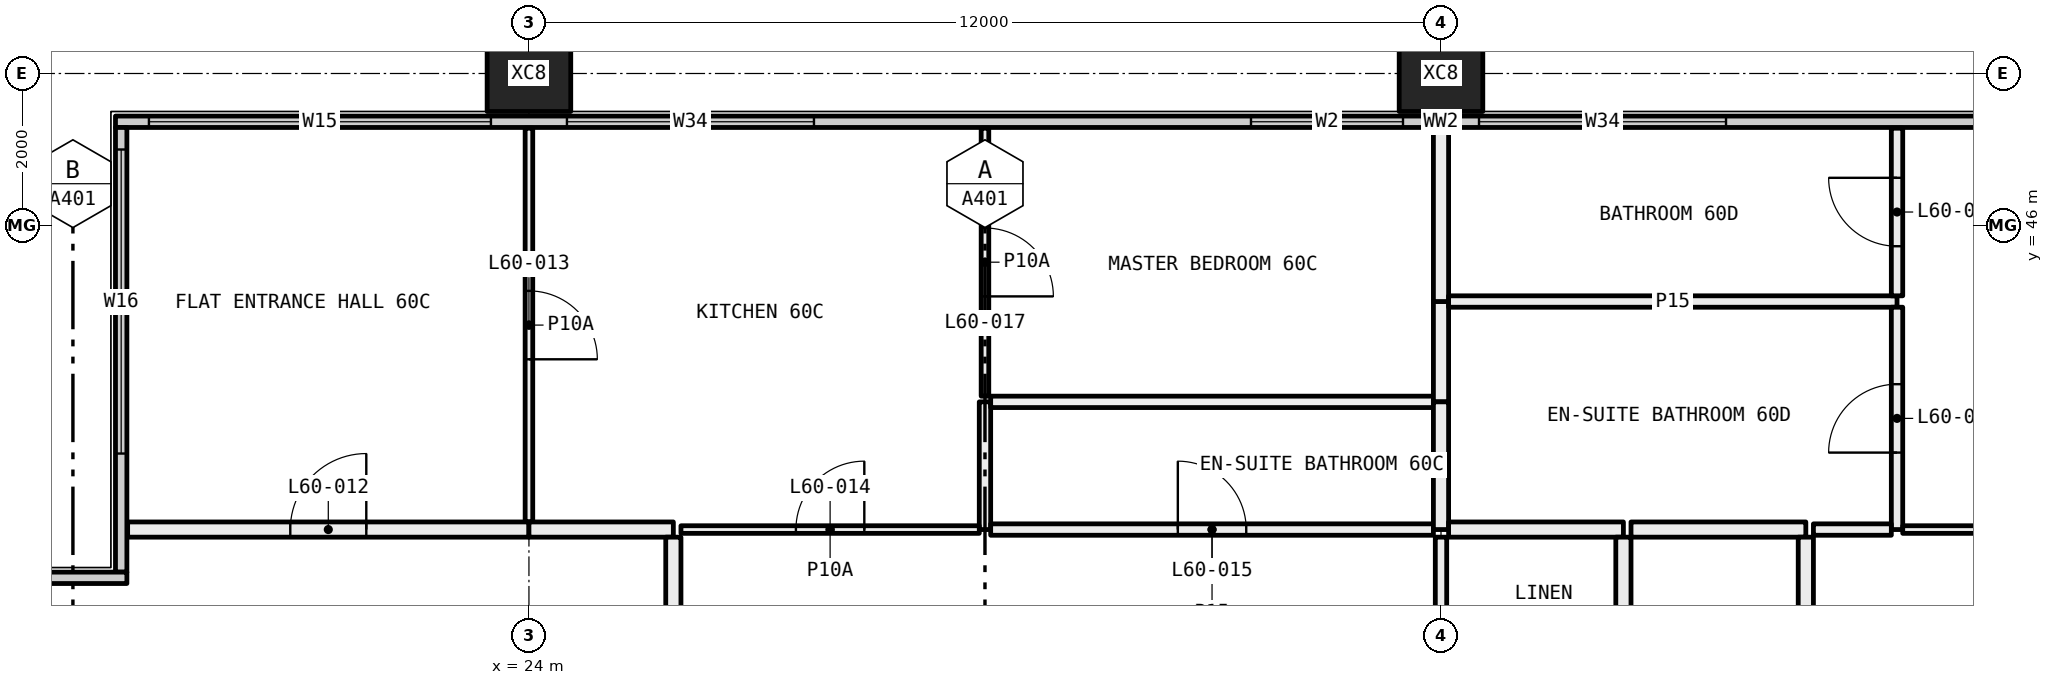
"""IFC4 building model, lengths in metres.
Left out: names, types, materials, properties, quantities, classifications, styles, units other than length and angle.
Written with IfcOpenShell. Run it as: python <this file> out.ifc"""

import sys

from ifc_helpers import new_model, si_unit, direction, frame, frame_2d, origin, origin_2d, place, context, subcontext, project, spatial, rectangle, hollow_rectangle, extrude, element, fill, save


model = new_model("IFC4")
c1 = context("Model", 3, precision=1e-05, world=origin(), true_north=direction((0.0, 1.0)))
c2 = subcontext(c1, "Body", "Model", "MODEL_VIEW")
j1 = project(units=[si_unit("LENGTHUNIT", "METRE"), si_unit("PLANEANGLEUNIT", "RADIAN")], contexts=[c1])
p1 = place(None, origin())
s1 = spatial("IfcSite", under=j1, at=p1, CompositionType="ELEMENT")
p2 = place(p1, origin())
s2 = spatial("IfcBuilding", under=s1, at=p2, CompositionType="ELEMENT")
p3 = place(p2, frame((0.0, 0.0, 224.85)))
s3 = spatial("IfcBuildingStorey", under=s2, at=p3, CompositionType="ELEMENT", Elevation=224.85)
for number, where, z_axis, x_axis in (
    (1, (24.0, 48.0, -0.4), (0.0, 0.0, 1.0), (1.0, 0.0, 0.0)),
    (2, (36.0, 48.0, -0.4), (0.0, 0.0, 1.0), (1.0, 0.0, 0.0)),
):
    element("IfcColumn", number, at=place(p3, frame(where, z_axis=z_axis, x_axis=x_axis)), inside=s3, PredefinedType="COLUMN", context=c2, shape_type="SweptSolid", body=[
        extrude(hollow_rectangle(XDim=1.1, YDim=1.0, WallThickness=0.04, at=origin_2d()), origin(), (0.0, 0.0, 1.0), 3.45),
    ])
p4 = place(p3, frame((18.56, 47.365, 0.0), z_axis=(0.0, 0.0, 1.0), x_axis=(1.0, 0.0, 0.0)))
e3 = element("IfcWall", 3, at=p4, inside=s3, PredefinedType="ELEMENTEDWALL", context=c2, shape_type="SweptSolid", body=[
    extrude(rectangle(XDim=34.88, YDim=0.15, at=frame_2d((17.44, 0.0))), origin(), (0.0, 0.0, 1.0), 3.05),
])
p5 = place(p4, frame((0.44, 0.0, 0.45)))
e4 = element("IfcOpeningElement", 4, at=p5, cuts=e3, PredefinedType="OPENING", context=c2, shape_type="SweptSolid", body=[
    extrude(rectangle(XDim=4.5, YDim=2.55, at=frame_2d((2.25, 1.275))), frame((0.0, 0.085, 0.0), z_axis=(0.0, -1.0, 0.0), x_axis=(1.0, 0.0, 0.0)), (0.0, 0.0, 1.0), 0.17),
])
p6 = place(p4, frame((5.94, 0.0, 0.45)))
e5 = element("IfcOpeningElement", 5, at=p6, cuts=e3, PredefinedType="OPENING", context=c2, shape_type="SweptSolid", body=[
    extrude(rectangle(XDim=3.25, YDim=2.55, at=frame_2d((1.625, 1.275))), frame((0.0, 0.085, 0.0), z_axis=(0.0, -1.0, 0.0), x_axis=(1.0, 0.0, 0.0)), (0.0, 0.0, 1.0), 0.17),
])
p7 = place(p4, frame((14.94, 0.0, 0.45)))
e6 = element("IfcOpeningElement", 6, at=p7, cuts=e3, PredefinedType="OPENING", context=c2, shape_type="SweptSolid", body=[
    extrude(rectangle(XDim=2.0, YDim=2.55, at=frame_2d((1.0, 1.275))), frame((0.0, 0.085, 0.0), z_axis=(0.0, -1.0, 0.0), x_axis=(1.0, 0.0, 0.0)), (0.0, 0.0, 1.0), 0.17),
])
p8 = place(p4, frame((17.94, 0.0, 0.45)))
e7 = element("IfcOpeningElement", 7, at=p8, cuts=e3, PredefinedType="OPENING", context=c2, shape_type="SweptSolid", body=[
    extrude(rectangle(XDim=3.25, YDim=2.55, at=frame_2d((1.625, 1.275))), frame((0.0, 0.085, 0.0), z_axis=(0.0, -1.0, 0.0), x_axis=(1.0, 0.0, 0.0)), (0.0, 0.0, 1.0), 0.17),
])
p9 = place(p4, frame((25.69, 0.0, 0.45)))
e8 = element("IfcOpeningElement", 8, at=p9, cuts=e3, PredefinedType="OPENING", context=c2, shape_type="SweptSolid", body=[
    extrude(rectangle(XDim=3.25, YDim=2.55, at=frame_2d((1.625, 1.275))), frame((0.0, 0.085, 0.0), z_axis=(0.0, -1.0, 0.0), x_axis=(1.0, 0.0, 0.0)), (0.0, 0.0, 1.0), 0.17),
])
p10 = place(p4, frame((29.94, 0.0, 0.45)))
e9 = element("IfcOpeningElement", 9, at=p10, cuts=e3, PredefinedType="OPENING", context=c2, shape_type="SweptSolid", body=[
    extrude(rectangle(XDim=4.5, YDim=2.55, at=frame_2d((2.25, 1.275))), frame((0.0, 0.085, 0.0), z_axis=(0.0, -1.0, 0.0), x_axis=(1.0, 0.0, 0.0)), (0.0, 0.0, 1.0), 0.17),
])
p11 = place(p3, frame((18.635, 41.44, 0.0), z_axis=(0.0, 0.0, 1.0), x_axis=(0.0, 1.0, 0.0)))
e10 = element("IfcWall", 10, at=p11, inside=s3, PredefinedType="ELEMENTEDWALL", context=c2, shape_type="SweptSolid", body=[
    extrude(rectangle(XDim=5.85, YDim=0.15, at=frame_2d((2.925, 0.0))), origin(), (0.0, 0.0, 1.0), 3.05),
])
p12 = place(p11, frame((1.56, 0.0, 0.45)))
e11 = element("IfcOpeningElement", 11, at=p12, cuts=e10, PredefinedType="OPENING", context=c2, shape_type="SweptSolid", body=[
    extrude(rectangle(XDim=4.0, YDim=2.55, at=frame_2d((2.0, 1.275))), frame((0.0, 0.085, 0.0), z_axis=(0.0, -1.0, 0.0), x_axis=(1.0, 0.0, 0.0)), (0.0, 0.0, 1.0), 0.17),
])
p13 = place(p3, frame((12.56, 41.365, 0.0), z_axis=(0.0, 0.0, 1.0), x_axis=(1.0, 0.0, 0.0)))
e12 = element("IfcWall", 12, at=p13, inside=s3, PredefinedType="ELEMENTEDWALL", context=c2, shape_type="SweptSolid", body=[
    extrude(rectangle(XDim=6.15, YDim=0.15, at=frame_2d((3.075, 0.0))), origin(), (0.0, 0.0, 1.0), 3.05),
])
p14 = place(p13, frame((0.44, 0.0, 0.45)))
e13 = element("IfcOpeningElement", 13, at=p14, cuts=e12, PredefinedType="OPENING", context=c2, shape_type="SweptSolid", body=[
    extrude(rectangle(XDim=4.0, YDim=2.55, at=frame_2d((2.0, 1.275))), frame((0.0, 0.085, 0.0), z_axis=(0.0, -1.0, 0.0), x_axis=(1.0, 0.0, 0.0)), (0.0, 0.0, 1.0), 0.17),
])
p15 = place(p3, frame((24.0, 42.1, 0.0), z_axis=(0.0, 0.0, 1.0), x_axis=(0.0, 1.0, 0.0)))
e14 = element("IfcWall", 14, at=p15, inside=s3, PredefinedType="PARTITIONING", context=c2, shape_type="SweptSolid", body=[
    extrude(rectangle(XDim=5.18, YDim=0.1, at=frame_2d((2.59, 0.0))), origin(), (0.0, 0.0, 1.0), 3.05),
])
p16 = place(p15, frame((2.14, 0.0, 0.0)))
e15 = element("IfcOpeningElement", 15, at=p16, cuts=e14, PredefinedType="OPENING", context=c2, shape_type="SweptSolid", body=[
    extrude(rectangle(XDim=0.9, YDim=2.1, at=frame_2d((0.45, 1.05))), frame((0.0, 0.06, 0.0), z_axis=(0.0, -1.0, 0.0), x_axis=(1.0, 0.0, 0.0)), (0.0, 0.0, 1.0), 0.12),
])
p17 = place(p3, frame((18.72, 42.0, 0.0), z_axis=(0.0, 0.0, 1.0), x_axis=(1.0, 0.0, 0.0)))
e16 = element("IfcWall", 16, at=p17, inside=s3, PredefinedType="PARTITIONING", context=c2, shape_type="SweptSolid", body=[
    extrude(rectangle(XDim=5.28, YDim=0.2, at=frame_2d((2.64, 0.0))), origin(), (0.0, 0.0, 1.0), 3.05),
])
p18 = place(p17, frame((2.14, 0.0, 0.0)))
e17 = element("IfcOpeningElement", 17, at=p18, cuts=e16, PredefinedType="OPENING", context=c2, shape_type="SweptSolid", body=[
    extrude(rectangle(XDim=1.0, YDim=2.1, at=frame_2d((0.5, 1.05))), frame((0.0, 0.11, 0.0), z_axis=(0.0, -1.0, 0.0), x_axis=(1.0, 0.0, 0.0)), (0.0, 0.0, 1.0), 0.22),
])
p19 = place(p3, frame((30.0, 43.755, 0.0), z_axis=(0.0, 0.0, 1.0), x_axis=(0.0, 1.0, 0.0)))
e18 = element("IfcWall", 18, at=p19, inside=s3, PredefinedType="PARTITIONING", context=c2, shape_type="SweptSolid", body=[
    extrude(rectangle(XDim=3.525, YDim=0.1, at=frame_2d((1.763, 0.0))), origin(), (0.0, 0.0, 1.0), 3.05),
])
p20 = place(p19, frame((1.312, 0.0, 0.0)))
e19 = element("IfcOpeningElement", 19, at=p20, cuts=e18, PredefinedType="OPENING", context=c2, shape_type="SweptSolid", body=[
    extrude(rectangle(XDim=0.9, YDim=2.1, at=frame_2d((0.45, 1.05))), frame((0.0, 0.06, 0.0), z_axis=(0.0, -1.0, 0.0), x_axis=(1.0, 0.0, 0.0)), (0.0, 0.0, 1.0), 0.12),
])
p21 = place(p3, frame((30.0, 42.0, 0.0), z_axis=(0.0, 0.0, 1.0), x_axis=(0.0, 1.0, 0.0)))
e20 = element("IfcWall", 20, at=p21, inside=s3, PredefinedType="PARTITIONING", context=c2, shape_type="SweptSolid", body=[
    extrude(rectangle(XDim=1.68, YDim=0.15, at=frame_2d((0.84, 0.0))), origin(), (0.0, 0.0, 1.0), 3.05),
])
p22 = place(p3, frame((26.0, 42.0, 0.0), z_axis=(0.0, 0.0, 1.0), x_axis=(1.0, 0.0, 0.0)))
e21 = element("IfcWall", 21, at=p22, inside=s3, PredefinedType="PARTITIONING", context=c2, shape_type="SweptSolid", body=[
    extrude(rectangle(XDim=3.925, YDim=0.1, at=frame_2d((1.962, 0.0))), origin(), (0.0, 0.0, 1.0), 3.05),
])
p23 = place(p22, frame((1.512, 0.0, 0.0)))
e22 = element("IfcOpeningElement", 22, at=p23, cuts=e21, PredefinedType="OPENING", context=c2, shape_type="SweptSolid", body=[
    extrude(rectangle(XDim=0.9, YDim=2.1, at=frame_2d((0.45, 1.05))), frame((0.0, 0.06, 0.0), z_axis=(0.0, -1.0, 0.0), x_axis=(1.0, 0.0, 0.0)), (0.0, 0.0, 1.0), 0.12),
])
p24 = place(p3, frame((24.0, 42.0, 0.0), z_axis=(0.0, 0.0, 1.0), x_axis=(1.0, 0.0, 0.0)))
e23 = element("IfcWall", 23, at=p24, inside=s3, PredefinedType="PARTITIONING", context=c2, shape_type="SweptSolid", body=[
    extrude(rectangle(XDim=1.9, YDim=0.2, at=frame_2d((0.95, 0.0))), origin(), (0.0, 0.0, 1.0), 3.05),
])
p25 = place(p3, frame((30.075, 43.68, 0.0), z_axis=(0.0, 0.0, 1.0), x_axis=(1.0, 0.0, 0.0)))
e24 = element("IfcWall", 24, at=p25, inside=s3, PredefinedType="PARTITIONING", context=c2, shape_type="SweptSolid", body=[
    extrude(rectangle(XDim=5.825, YDim=0.15, at=frame_2d((2.913, 0.0))), origin(), (0.0, 0.0, 1.0), 3.05),
])
p26 = place(p3, frame((36.0, 43.68, 0.0), z_axis=(0.0, 0.0, 1.0), x_axis=(0.0, 1.0, 0.0)))
e25 = element("IfcWall", 25, at=p26, inside=s3, PredefinedType="PARTITIONING", context=c2, shape_type="SweptSolid", body=[
    extrude(rectangle(XDim=1.32, YDim=0.2, at=frame_2d((0.66, 0.0))), origin(), (0.0, 0.0, 1.0), 2.45),
])
p27 = place(p3, frame((36.0, 45.0, 0.0), z_axis=(0.0, 0.0, 1.0), x_axis=(0.0, 1.0, 0.0)))
e26 = element("IfcWall", 26, at=p27, inside=s3, PredefinedType="PARTITIONING", context=c2, shape_type="SweptSolid", body=[
    extrude(rectangle(XDim=2.28, YDim=0.2, at=frame_2d((1.14, 0.0))), origin(), (0.0, 0.0, 1.0), 2.45),
])
p28 = place(p3, frame((30.075, 42.0, 0.0), z_axis=(0.0, 0.0, 1.0), x_axis=(1.0, 0.0, 0.0)))
e27 = element("IfcWall", 27, at=p28, inside=s3, PredefinedType="PARTITIONING", context=c2, shape_type="SweptSolid", body=[
    extrude(rectangle(XDim=5.825, YDim=0.15, at=frame_2d((2.913, 0.0))), origin(), (0.0, 0.0, 1.0), 3.05),
])
p29 = place(p28, frame((2.462, 0.0, 0.0)))
e28 = element("IfcOpeningElement", 28, at=p29, cuts=e27, PredefinedType="OPENING", context=c2, shape_type="SweptSolid", body=[
    extrude(rectangle(XDim=0.9, YDim=2.1, at=frame_2d((0.45, 1.05))), frame((0.0, 0.085, 0.0), z_axis=(0.0, -1.0, 0.0), x_axis=(1.0, 0.0, 0.0)), (0.0, 0.0, 1.0), 0.17),
])
p30 = place(p3, frame((36.0, 42.0, 0.0), z_axis=(0.0, 0.0, 1.0), x_axis=(0.0, 1.0, 0.0)))
e29 = element("IfcWall", 29, at=p30, inside=s3, PredefinedType="PARTITIONING", context=c2, shape_type="SweptSolid", body=[
    extrude(rectangle(XDim=1.68, YDim=0.2, at=frame_2d((0.84, 0.0))), origin(), (0.0, 0.0, 1.0), 2.45),
])
p31 = place(p3, frame((36.0, 38.25, 0.0), z_axis=(0.0, 0.0, 1.0), x_axis=(0.0, 1.0, 0.0)))
e30 = element("IfcWall", 30, at=p31, inside=s3, PredefinedType="PARTITIONING", context=c2, shape_type="SweptSolid", body=[
    extrude(rectangle(XDim=3.65, YDim=0.15, at=frame_2d((1.825, 0.0))), origin(), (0.0, 0.0, 1.0), 2.45),
])
p32 = place(p31, frame((1.375, 0.0, 0.0)))
e31 = element("IfcOpeningElement", 31, at=p32, cuts=e30, PredefinedType="OPENING", context=c2, shape_type="SweptSolid", body=[
    extrude(rectangle(XDim=0.9, YDim=2.1, at=frame_2d((0.45, 1.05))), frame((0.0, 0.085, 0.0), z_axis=(0.0, -1.0, 0.0), x_axis=(1.0, 0.0, 0.0)), (0.0, 0.0, 1.0), 0.17),
])
p33 = place(p3, frame((25.9, 41.9, 0.0), z_axis=(0.0, 0.0, 1.0), x_axis=(0.0, -1.0, 0.0)))
e32 = element("IfcWall", 32, at=p33, inside=s3, PredefinedType="PARTITIONING", context=c2, shape_type="SweptSolid", body=[
    extrude(rectangle(XDim=5.9, YDim=0.2, at=frame_2d((2.95, 0.0))), origin(), (0.0, 0.0, 1.0), 2.45),
])
p34 = place(p3, frame((38.4, 42.0, 0.0), z_axis=(0.0, 0.0, 1.0), x_axis=(-1.0, 0.0, 0.0)))
e33 = element("IfcWall", 33, at=p34, inside=s3, PredefinedType="PARTITIONING", context=c2, shape_type="SweptSolid", body=[
    extrude(rectangle(XDim=2.3, YDim=0.2, at=frame_2d((1.15, 0.0))), origin(), (0.0, 0.0, 1.0), 3.05),
])
p35 = place(p3, frame((38.4, 38.25, 0.0), z_axis=(0.0, 0.0, 1.0), x_axis=(0.0, 1.0, 0.0)))
e34 = element("IfcWall", 34, at=p35, inside=s3, PredefinedType="PARTITIONING", context=c2, shape_type="SweptSolid", body=[
    extrude(rectangle(XDim=3.65, YDim=0.2, at=frame_2d((1.825, 0.0))), origin(), (0.0, 0.0, 1.0), 3.05),
])
p36 = place(p3, frame((42.0, 45.0, 0.0), z_axis=(0.0, 0.0, 1.0), x_axis=(-1.0, 0.0, 0.0)))
e35 = element("IfcWall", 35, at=p36, inside=s3, PredefinedType="PARTITIONING", context=c2, shape_type="SweptSolid", body=[
    extrude(rectangle(XDim=5.9, YDim=0.15, at=frame_2d((2.95, 0.0))), origin(), (0.0, 0.0, 1.0), 3.05),
])
p37 = place(p3, frame((42.0, 42.0, 0.0), z_axis=(0.0, 0.0, 1.0), x_axis=(0.0, 1.0, 0.0)))
e36 = element("IfcWall", 36, at=p37, inside=s3, PredefinedType="PARTITIONING", context=c2, shape_type="SweptSolid", body=[
    extrude(rectangle(XDim=2.925, YDim=0.15, at=frame_2d((1.462, 0.0))), origin(), (0.0, 0.0, 1.0), 3.05),
])
p38 = place(p37, frame((1.012, 0.0, 0.0)))
e37 = element("IfcOpeningElement", 37, at=p38, cuts=e36, PredefinedType="OPENING", context=c2, shape_type="SweptSolid", body=[
    extrude(rectangle(XDim=0.9, YDim=2.1, at=frame_2d((0.45, 1.05))), frame((0.0, 0.085, 0.0), z_axis=(0.0, -1.0, 0.0), x_axis=(1.0, 0.0, 0.0)), (0.0, 0.0, 1.0), 0.17),
])
p39 = place(p3, frame((40.9, 42.0, 0.0), z_axis=(0.0, 0.0, 1.0), x_axis=(1.0, 0.0, 0.0)))
e38 = element("IfcWall", 38, at=p39, inside=s3, PredefinedType="PARTITIONING", context=c2, shape_type="SweptSolid", body=[
    extrude(rectangle(XDim=1.025, YDim=0.15, at=frame_2d((0.513, 0.0))), origin(), (0.0, 0.0, 1.0), 3.05),
])
p40 = place(p3, frame((38.5, 42.0, 0.0), z_axis=(0.0, 0.0, 1.0), x_axis=(1.0, 0.0, 0.0)))
e39 = element("IfcWall", 39, at=p40, inside=s3, PredefinedType="PARTITIONING", context=c2, shape_type="SweptSolid", body=[
    extrude(rectangle(XDim=2.3, YDim=0.2, at=frame_2d((1.15, 0.0))), origin(), (0.0, 0.0, 1.0), 3.05),
])
p41 = place(p3, frame((42.0, 45.075, 0.0), z_axis=(0.0, 0.0, 1.0), x_axis=(0.0, 1.0, 0.0)))
e40 = element("IfcWall", 40, at=p41, inside=s3, PredefinedType="PARTITIONING", context=c2, shape_type="SweptSolid", body=[
    extrude(rectangle(XDim=2.205, YDim=0.15, at=frame_2d((1.103, 0.0))), origin(), (0.0, 0.0, 1.0), 3.05),
])
p42 = place(p41, frame((0.653, 0.0, 0.0)))
e41 = element("IfcOpeningElement", 41, at=p42, cuts=e40, PredefinedType="OPENING", context=c2, shape_type="SweptSolid", body=[
    extrude(rectangle(XDim=0.9, YDim=2.1, at=frame_2d((0.45, 1.05))), frame((0.0, 0.085, 0.0), z_axis=(0.0, -1.0, 0.0), x_axis=(1.0, 0.0, 0.0)), (0.0, 0.0, 1.0), 0.17),
])
p43 = place(p3, frame((42.075, 42.0, 0.0), z_axis=(0.0, 0.0, 1.0), x_axis=(1.0, 0.0, 0.0)))
e42 = element("IfcWall", 42, at=p43, inside=s3, PredefinedType="PARTITIONING", context=c2, shape_type="SweptSolid", body=[
    extrude(rectangle(XDim=3.925, YDim=0.1, at=frame_2d((1.962, 0.0))), origin(), (0.0, 0.0, 1.0), 3.05),
])
p44 = place(p43, frame((1.512, 0.0, 0.0)))
e43 = element("IfcOpeningElement", 43, at=p44, cuts=e42, PredefinedType="OPENING", context=c2, shape_type="SweptSolid", body=[
    extrude(rectangle(XDim=0.9, YDim=2.1, at=frame_2d((0.45, 1.05))), frame((0.0, 0.06, 0.0), z_axis=(0.0, -1.0, 0.0), x_axis=(1.0, 0.0, 0.0)), (0.0, 0.0, 1.0), 0.12),
])
p45 = place(p3, frame((40.8, 41.9, 0.0), z_axis=(0.0, 0.0, 1.0), x_axis=(0.0, -1.0, 0.0)))
e44 = element("IfcWall", 44, at=p45, inside=s3, PredefinedType="PARTITIONING", context=c2, shape_type="SweptSolid", body=[
    extrude(rectangle(XDim=5.9, YDim=0.2, at=frame_2d((2.95, 0.0))), origin(), (0.0, 0.0, 1.0), 2.45),
])
p46 = place(p5, origin())
e45 = element("IfcWindow", 45, at=p46, inside=s3, PartitioningType="SINGLE_PANEL", PredefinedType="WINDOW", context=c2, shape_type="SweptSolid", body=[
    extrude(rectangle(XDim=4.5, YDim=2.55, at=frame_2d((2.25, 1.275))), frame((0.0, 0.03, 0.0), z_axis=(0.0, -1.0, 0.0), x_axis=(1.0, 0.0, 0.0)), (0.0, 0.0, 1.0), 0.06),
])
fill(e4, e45)
p47 = place(p6, origin())
e46 = element("IfcWindow", 46, at=p47, inside=s3, PartitioningType="SINGLE_PANEL", PredefinedType="WINDOW", context=c2, shape_type="SweptSolid", body=[
    extrude(rectangle(XDim=3.25, YDim=2.55, at=frame_2d((1.625, 1.275))), frame((0.0, 0.03, 0.0), z_axis=(0.0, -1.0, 0.0), x_axis=(1.0, 0.0, 0.0)), (0.0, 0.0, 1.0), 0.06),
])
fill(e5, e46)
p48 = place(p7, origin())
e47 = element("IfcWindow", 47, at=p48, inside=s3, PartitioningType="SINGLE_PANEL", PredefinedType="WINDOW", context=c2, shape_type="SweptSolid", body=[
    extrude(rectangle(XDim=2.0, YDim=2.55, at=frame_2d((1.0, 1.275))), frame((0.0, 0.03, 0.0), z_axis=(0.0, -1.0, 0.0), x_axis=(1.0, 0.0, 0.0)), (0.0, 0.0, 1.0), 0.06),
])
fill(e6, e47)
p49 = place(p8, origin())
e48 = element("IfcWindow", 48, at=p49, inside=s3, PartitioningType="SINGLE_PANEL", PredefinedType="WINDOW", context=c2, shape_type="SweptSolid", body=[
    extrude(rectangle(XDim=3.25, YDim=2.55, at=frame_2d((1.625, 1.275))), frame((0.0, 0.03, 0.0), z_axis=(0.0, -1.0, 0.0), x_axis=(1.0, 0.0, 0.0)), (0.0, 0.0, 1.0), 0.06),
])
fill(e7, e48)
p50 = place(p12, origin())
e49 = element("IfcWindow", 49, at=p50, inside=s3, PartitioningType="SINGLE_PANEL", PredefinedType="WINDOW", context=c2, shape_type="SweptSolid", body=[
    extrude(rectangle(XDim=4.0, YDim=2.55, at=frame_2d((2.0, 1.275))), frame((0.0, 0.03, 0.0), z_axis=(0.0, -1.0, 0.0), x_axis=(1.0, 0.0, 0.0)), (0.0, 0.0, 1.0), 0.06),
])
fill(e11, e49)
p51 = place(p18, origin())
e50 = element("IfcDoor", 50, at=p51, inside=s3, OperationType="SINGLE_SWING_LEFT", PredefinedType="DOOR", context=c2, shape_type="SweptSolid", body=[
    extrude(rectangle(XDim=1.0, YDim=2.1, at=frame_2d((0.5, 1.05))), frame((0.0, 0.025, 0.0), z_axis=(0.0, -1.0, 0.0), x_axis=(1.0, 0.0, 0.0)), (0.0, 0.0, 1.0), 0.05),
])
fill(e17, e50)
p52 = place(p16, frame((0.9, 0.0, 0.0), x_axis=(-1.0, 0.0, 0.0)))
e51 = element("IfcDoor", 51, at=p52, inside=s3, OperationType="SINGLE_SWING_LEFT", PredefinedType="DOOR", context=c2, shape_type="SweptSolid", body=[
    extrude(rectangle(XDim=0.9, YDim=2.1, at=frame_2d((0.45, 1.05))), frame((0.0, 0.025, 0.0), z_axis=(0.0, -1.0, 0.0), x_axis=(1.0, 0.0, 0.0)), (0.0, 0.0, 1.0), 0.05),
])
fill(e15, e51)
p53 = place(p23, origin())
e52 = element("IfcDoor", 52, at=p53, inside=s3, OperationType="SINGLE_SWING_LEFT", PredefinedType="DOOR", context=c2, shape_type="SweptSolid", body=[
    extrude(rectangle(XDim=0.9, YDim=2.1, at=frame_2d((0.45, 1.05))), frame((0.0, 0.025, 0.0), z_axis=(0.0, -1.0, 0.0), x_axis=(1.0, 0.0, 0.0)), (0.0, 0.0, 1.0), 0.05),
])
fill(e22, e52)
p54 = place(p29, origin())
e53 = element("IfcDoor", 53, at=p54, inside=s3, OperationType="SINGLE_SWING_RIGHT", PredefinedType="DOOR", context=c2, shape_type="SweptSolid", body=[
    extrude(rectangle(XDim=0.9, YDim=2.1, at=frame_2d((0.45, 1.05))), frame((0.0, 0.025, 0.0), z_axis=(0.0, -1.0, 0.0), x_axis=(1.0, 0.0, 0.0)), (0.0, 0.0, 1.0), 0.05),
])
fill(e28, e53)
p55 = place(p20, frame((0.9, 0.0, 0.0), x_axis=(-1.0, 0.0, 0.0)))
e54 = element("IfcDoor", 54, at=p55, inside=s3, OperationType="SINGLE_SWING_LEFT", PredefinedType="DOOR", context=c2, shape_type="SweptSolid", body=[
    extrude(rectangle(XDim=0.9, YDim=2.1, at=frame_2d((0.45, 1.05))), frame((0.0, 0.025, 0.0), z_axis=(0.0, -1.0, 0.0), x_axis=(1.0, 0.0, 0.0)), (0.0, 0.0, 1.0), 0.05),
])
fill(e19, e54)
p56 = place(p38, origin())
e55 = element("IfcDoor", 55, at=p56, inside=s3, OperationType="SINGLE_SWING_RIGHT", PredefinedType="DOOR", context=c2, shape_type="SweptSolid", body=[
    extrude(rectangle(XDim=0.9, YDim=2.1, at=frame_2d((0.45, 1.05))), frame((0.0, 0.025, 0.0), z_axis=(0.0, -1.0, 0.0), x_axis=(1.0, 0.0, 0.0)), (0.0, 0.0, 1.0), 0.05),
])
fill(e37, e55)
p57 = place(p42, origin())
e56 = element("IfcDoor", 56, at=p57, inside=s3, OperationType="SINGLE_SWING_LEFT", PredefinedType="DOOR", context=c2, shape_type="SweptSolid", body=[
    extrude(rectangle(XDim=0.9, YDim=2.1, at=frame_2d((0.45, 1.05))), frame((0.0, 0.025, 0.0), z_axis=(0.0, -1.0, 0.0), x_axis=(1.0, 0.0, 0.0)), (0.0, 0.0, 1.0), 0.05),
])
fill(e41, e56)
save(model, sys.argv[1])
